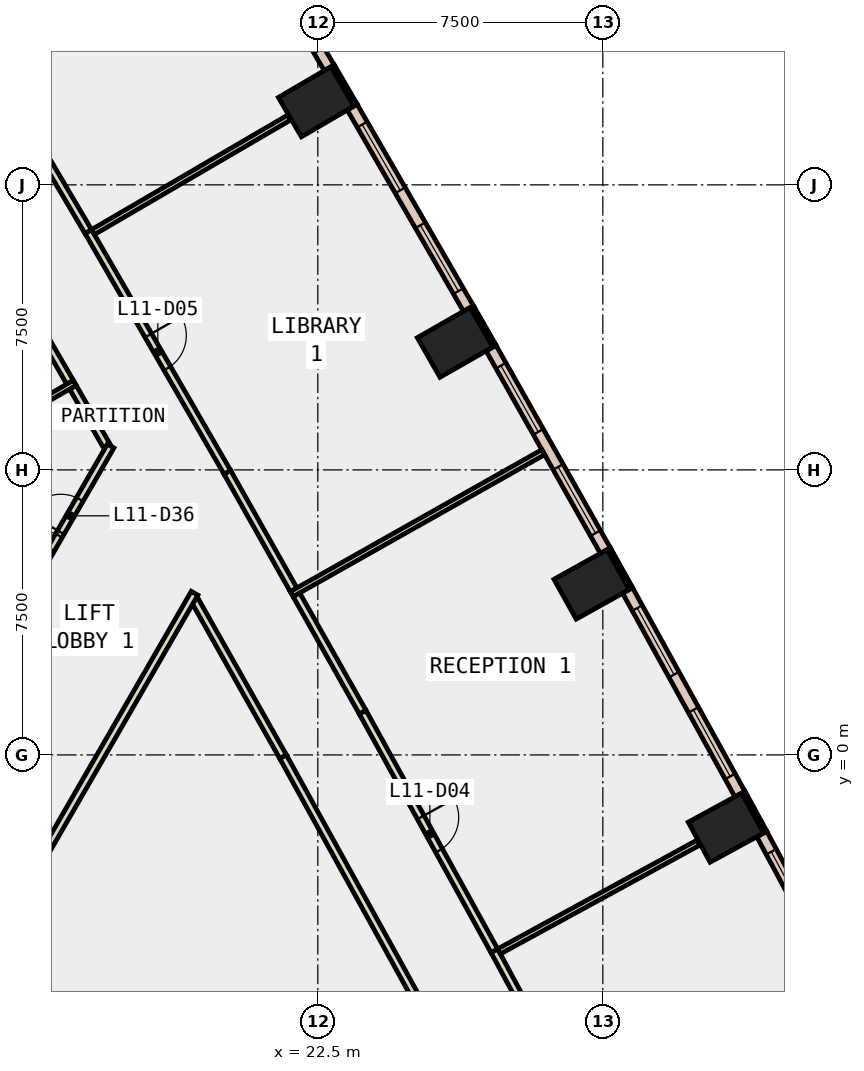
"""IFC4 building model, lengths in metres.
Left out: names, types, materials, properties, quantities, classifications, styles, units other than length and angle.
Written with IfcOpenShell. Run it as: python <this file> out.ifc"""

import sys

from ifc_helpers import new_model, si_unit, direction, frame, frame_2d, origin, origin_2d, place, context, subcontext, project, spatial, rectangle, extrude, element, fill, save


model = new_model("IFC4")
c1 = context("Model", 3, precision=1e-05, world=origin(), true_north=direction((0.0, 1.0)))
c2 = subcontext(c1, "Body", "Model", "MODEL_VIEW")
j1 = project(units=[si_unit("LENGTHUNIT", "METRE"), si_unit("PLANEANGLEUNIT", "RADIAN")], contexts=[c1])
p1 = place(None, origin())
s1 = spatial("IfcSite", under=j1, at=p1, CompositionType="ELEMENT")
p2 = place(p1, origin())
s2 = spatial("IfcBuilding", under=s1, at=p2, CompositionType="ELEMENT")
p3 = place(p2, frame((0.0, 0.0, 56.0)))
s3 = spatial("IfcBuildingStorey", under=s2, at=p3, CompositionType="ELEMENT", Elevation=56.0)
for number, where, z_axis, x_axis in (
    (1, (33.238, -1.913, -0.4), (0.0, 0.0, 1.0), (-0.478, 0.878, 0.0)),
    (2, (29.706, 4.487, -0.4), (0.0, 0.0, 1.0), (-0.487, 0.873, 0.0)),
    (3, (26.112, 10.855, -0.4), (0.0, 0.0, 1.0), (-0.496, 0.869, 0.0)),
    (4, (22.457, 17.186, -0.4), (0.0, 0.0, 1.0), (-0.504, 0.864, 0.0)),
):
    element("IfcColumn", number, at=place(p3, frame(where, z_axis=z_axis, x_axis=x_axis)), inside=s3, PredefinedType="COLUMN", context=c2, shape_type="SweptSolid", body=[
        extrude(rectangle(XDim=1.2, YDim=1.6, at=origin_2d()), origin(), (0.0, 0.0, 1.0), 4.2),
    ])
p4 = place(p3, frame((9.31, -5.375, -0.4), z_axis=(0.0, 0.0, 1.0), x_axis=(0.866017533419, -0.500013631625, 0.0)))
e5 = element("IfcWall", 5, at=p4, inside=s3, PredefinedType="SHEAR", context=c2, shape_type="SweptSolid", body=[
    extrude(rectangle(XDim=9.0, YDim=0.8, at=frame_2d((4.5, 0.0))), origin(), (0.0, 0.0, 1.0), 4.2),
])
p5 = place(p3, frame((34.271, -2.034, 0.0), z_axis=(0.0, 0.0, 1.0), x_axis=(-0.478267644701, 0.878214131082, 0.0)))
e6 = element("IfcWall", 6, at=p5, inside=s3, PredefinedType="STANDARD", context=c2, shape_type="SweptSolid", body=[
    extrude(rectangle(XDim=1.2, YDim=0.1, at=frame_2d((0.6, 0.0))), origin(), (0.0, 0.0, 1.0), 3.8),
])
p6 = place(p3, frame((30.74, 4.377, 0.0), z_axis=(0.0, 0.0, 1.0), x_axis=(-0.486730996044, 0.87355190887, 0.0)))
e7 = element("IfcWall", 7, at=p6, inside=s3, PredefinedType="STANDARD", context=c2, shape_type="SweptSolid", body=[
    extrude(rectangle(XDim=1.2, YDim=0.1, at=frame_2d((0.6, 0.0))), origin(), (0.0, 0.0, 1.0), 3.8),
])
p7 = place(p3, frame((27.148, 10.755, 0.0), z_axis=(0.0, 0.0, 1.0), x_axis=(-0.495766453659, 0.86845588456, 0.0)))
e8 = element("IfcWall", 8, at=p7, inside=s3, PredefinedType="STANDARD", context=c2, shape_type="SweptSolid", body=[
    extrude(rectangle(XDim=1.2, YDim=0.1, at=frame_2d((0.6, 0.0))), origin(), (0.0, 0.0, 1.0), 3.8),
])
p8 = place(p3, frame((23.493, 17.097, 0.0), z_axis=(0.0, 0.0, 1.0), x_axis=(-0.504225229382, 0.863572184623, 0.0)))
e9 = element("IfcWall", 9, at=p8, inside=s3, PredefinedType="STANDARD", context=c2, shape_type="SweptSolid", body=[
    extrude(rectangle(XDim=1.2, YDim=0.1, at=frame_2d((0.6, 0.0))), origin(), (0.0, 0.0, 1.0), 3.8),
])
p9 = place(p3, frame((37.086, -7.47, 0.0), z_axis=(0.0, 0.0, 1.0), x_axis=(-0.474584950749, 0.880209704856, 0.0)))
e10 = element("IfcWall", 10, at=p9, inside=s3, PredefinedType="STANDARD", context=c2, shape_type="SweptSolid", body=[
    extrude(rectangle(XDim=6.121, YDim=0.3, at=frame_2d((3.061, 0.0))), origin(), (0.0, 0.0, 1.0), 3.8),
])
p10 = place(p9, frame((0.53, 0.0, 0.9)))
e11 = element("IfcOpeningElement", 11, at=p10, cuts=e10, PredefinedType="OPENING", context=c2, shape_type="SweptSolid", body=[
    extrude(rectangle(XDim=2.0, YDim=2.6, at=frame_2d((1.0, 1.3))), frame((0.0, 0.16, 0.0), z_axis=(0.0, -1.0, 0.0), x_axis=(1.0, 0.0, 0.0)), (0.0, 0.0, 1.0), 0.32),
])
p11 = place(p9, frame((3.591, 0.0, 0.9)))
e12 = element("IfcOpeningElement", 12, at=p11, cuts=e10, PredefinedType="OPENING", context=c2, shape_type="SweptSolid", body=[
    extrude(rectangle(XDim=2.0, YDim=2.6, at=frame_2d((1.0, 1.3))), frame((0.0, 0.16, 0.0), z_axis=(0.0, -1.0, 0.0), x_axis=(1.0, 0.0, 0.0)), (0.0, 0.0, 1.0), 0.32),
])
p12 = place(p3, frame((33.607, -1.03, 0.0), z_axis=(0.0, 0.0, 1.0), x_axis=(-0.483195456594, 0.875512507465, 0.0)))
e13 = element("IfcWall", 13, at=p12, inside=s3, PredefinedType="STANDARD", context=c2, shape_type="SweptSolid", body=[
    extrude(rectangle(XDim=6.12, YDim=0.3, at=frame_2d((3.06, 0.0))), origin(), (0.0, 0.0, 1.0), 3.8),
])
p13 = place(p12, frame((0.53, 0.0, 0.9)))
e14 = element("IfcOpeningElement", 14, at=p13, cuts=e13, PredefinedType="OPENING", context=c2, shape_type="SweptSolid", body=[
    extrude(rectangle(XDim=2.0, YDim=2.6, at=frame_2d((1.0, 1.3))), frame((0.0, 0.16, 0.0), z_axis=(0.0, -1.0, 0.0), x_axis=(1.0, 0.0, 0.0)), (0.0, 0.0, 1.0), 0.32),
])
p14 = place(p12, frame((3.59, 0.0, 0.9)))
e15 = element("IfcOpeningElement", 15, at=p14, cuts=e13, PredefinedType="OPENING", context=c2, shape_type="SweptSolid", body=[
    extrude(rectangle(XDim=2.0, YDim=2.6, at=frame_2d((1.0, 1.3))), frame((0.0, 0.16, 0.0), z_axis=(0.0, -1.0, 0.0), x_axis=(1.0, 0.0, 0.0)), (0.0, 0.0, 1.0), 0.32),
])
p15 = place(p3, frame((30.067, 5.374, 0.0), z_axis=(0.0, 0.0, 1.0), x_axis=(-0.49151046248, 0.870871669807, 0.0)))
e16 = element("IfcWall", 16, at=p15, inside=s3, PredefinedType="STANDARD", context=c2, shape_type="SweptSolid", body=[
    extrude(rectangle(XDim=6.122, YDim=0.3, at=frame_2d((3.061, 0.0))), origin(), (0.0, 0.0, 1.0), 3.8),
])
p16 = place(p15, frame((0.53, 0.0, 0.9)))
e17 = element("IfcOpeningElement", 17, at=p16, cuts=e16, PredefinedType="OPENING", context=c2, shape_type="SweptSolid", body=[
    extrude(rectangle(XDim=2.0, YDim=2.6, at=frame_2d((1.0, 1.3))), frame((0.0, 0.16, 0.0), z_axis=(0.0, -1.0, 0.0), x_axis=(1.0, 0.0, 0.0)), (0.0, 0.0, 1.0), 0.32),
])
p17 = place(p15, frame((3.591, 0.0, 0.9)))
e18 = element("IfcOpeningElement", 18, at=p17, cuts=e16, PredefinedType="OPENING", context=c2, shape_type="SweptSolid", body=[
    extrude(rectangle(XDim=2.0, YDim=2.6, at=frame_2d((1.0, 1.3))), frame((0.0, 0.16, 0.0), z_axis=(0.0, -1.0, 0.0), x_axis=(1.0, 0.0, 0.0)), (0.0, 0.0, 1.0), 0.32),
])
p18 = place(p3, frame((26.464, 11.745, 0.0), z_axis=(0.0, 0.0, 1.0), x_axis=(-0.499957248001, 0.866050085256, 0.0)))
e19 = element("IfcWall", 19, at=p18, inside=s3, PredefinedType="STANDARD", context=c2, shape_type="SweptSolid", body=[
    extrude(rectangle(XDim=6.121, YDim=0.3, at=frame_2d((3.06, 0.0))), origin(), (0.0, 0.0, 1.0), 3.8),
])
p19 = place(p18, frame((0.53, 0.0, 0.9)))
e20 = element("IfcOpeningElement", 20, at=p19, cuts=e19, PredefinedType="OPENING", context=c2, shape_type="SweptSolid", body=[
    extrude(rectangle(XDim=2.0, YDim=2.6, at=frame_2d((1.0, 1.3))), frame((0.0, 0.16, 0.0), z_axis=(0.0, -1.0, 0.0), x_axis=(1.0, 0.0, 0.0)), (0.0, 0.0, 1.0), 0.32),
])
p20 = place(p18, frame((3.591, 0.0, 0.9)))
e21 = element("IfcOpeningElement", 21, at=p20, cuts=e19, PredefinedType="OPENING", context=c2, shape_type="SweptSolid", body=[
    extrude(rectangle(XDim=2.0, YDim=2.6, at=frame_2d((1.0, 1.3))), frame((0.0, 0.16, 0.0), z_axis=(0.0, -1.0, 0.0), x_axis=(1.0, 0.0, 0.0)), (0.0, 0.0, 1.0), 0.32),
])
p21 = place(p3, frame((22.8, 18.08, 0.0), z_axis=(0.0, 0.0, 1.0), x_axis=(-0.508412153373, 0.861113861404, 0.0)))
e22 = element("IfcWall", 22, at=p21, inside=s3, PredefinedType="STANDARD", context=c2, shape_type="SweptSolid", body=[
    extrude(rectangle(XDim=6.121, YDim=0.3, at=frame_2d((3.061, 0.0))), origin(), (0.0, 0.0, 1.0), 3.8),
])
p22 = place(p21, frame((0.53, 0.0, 0.9)))
e23 = element("IfcOpeningElement", 23, at=p22, cuts=e22, PredefinedType="OPENING", context=c2, shape_type="SweptSolid", body=[
    extrude(rectangle(XDim=2.0, YDim=2.6, at=frame_2d((1.0, 1.3))), frame((0.0, 0.16, 0.0), z_axis=(0.0, -1.0, 0.0), x_axis=(1.0, 0.0, 0.0)), (0.0, 0.0, 1.0), 0.32),
])
p23 = place(p21, frame((3.591, 0.0, 0.9)))
e24 = element("IfcOpeningElement", 24, at=p23, cuts=e22, PredefinedType="OPENING", context=c2, shape_type="SweptSolid", body=[
    extrude(rectangle(XDim=2.0, YDim=2.6, at=frame_2d((1.0, 1.3))), frame((0.0, 0.16, 0.0), z_axis=(0.0, -1.0, 0.0), x_axis=(1.0, 0.0, 0.0)), (0.0, 0.0, 1.0), 0.32),
])
p24 = place(p3, frame((15.98, 9.805, 0.0), z_axis=(0.0, 0.0, 1.0), x_axis=(-0.500150684419, 0.865938388614, 0.0)))
e25 = element("IfcWall", 25, at=p24, inside=s3, PredefinedType="PARTITIONING", context=c2, shape_type="SweptSolid", body=[
    extrude(rectangle(XDim=3.109, YDim=0.2, at=frame_2d((1.554, 0.0))), origin(), (0.0, 0.0, 1.0), 3.8),
])
p25 = place(p3, frame((16.948, 8.128, 0.0), z_axis=(0.0, 0.0, 1.0), x_axis=(-0.499931460552, 0.866064971437, 0.0)))
e26 = element("IfcWall", 26, at=p25, inside=s3, PredefinedType="PARTITIONING", context=c2, shape_type="SweptSolid", body=[
    extrude(rectangle(XDim=1.786, YDim=0.2, at=frame_2d((0.893, 0.0))), origin(), (0.0, 0.0, 1.0), 3.8),
])
p26 = place(p3, frame((25.074, -6.368, 0.0), z_axis=(0.0, 0.0, 1.0), x_axis=(-0.483126495407, 0.875550563609, 0.0)))
e27 = element("IfcWall", 27, at=p26, inside=s3, PredefinedType="PARTITIONING", context=c2, shape_type="SweptSolid", body=[
    extrude(rectangle(XDim=7.222, YDim=0.2, at=frame_2d((3.611, 0.0))), origin(), (0.0, 0.0, 1.0), 3.8),
])
p27 = place(p3, frame((21.585, -0.045, 0.0), z_axis=(0.0, 0.0, 1.0), x_axis=(-0.491542684896, 0.870853483042, 0.0)))
e28 = element("IfcWall", 28, at=p27, inside=s3, PredefinedType="PARTITIONING", context=c2, shape_type="SweptSolid", body=[
    extrude(rectangle(XDim=4.738, YDim=0.2, at=frame_2d((2.369, 0.0))), origin(), (0.0, 0.0, 1.0), 3.8),
])
p28 = place(p3, frame((27.145, -5.152, 0.0), z_axis=(0.0, 0.0, 1.0), x_axis=(0.474591029089, -0.880206427554, 0.0)))
e29 = element("IfcWall", 29, at=p28, inside=s3, PredefinedType="PARTITIONING", context=c2, shape_type="SweptSolid", body=[
    extrude(rectangle(XDim=7.32, YDim=0.2, at=frame_2d((3.66, 0.0))), origin(), (0.0, 0.0, 1.0), 3.8),
])
p29 = place(p28, frame((3.235, 0.0, 0.0)))
e30 = element("IfcOpeningElement", 30, at=p29, cuts=e29, PredefinedType="OPENING", context=c2, shape_type="SweptSolid", body=[
    extrude(rectangle(XDim=1.0, YDim=2.1, at=frame_2d((0.5, 1.05))), frame((0.0, 0.11, 0.0), z_axis=(0.0, -1.0, 0.0), x_axis=(1.0, 0.0, 0.0)), (0.0, 0.0, 1.0), 0.22),
])
p30 = place(p3, frame((21.937, 4.214, 0.0), z_axis=(0.0, 0.0, 1.0), x_axis=(0.491485799319, -0.870885588965, 0.0)))
e31 = element("IfcWall", 31, at=p30, inside=s3, PredefinedType="PARTITIONING", context=c2, shape_type="SweptSolid", body=[
    extrude(rectangle(XDim=3.548, YDim=0.2, at=frame_2d((1.774, 0.0))), origin(), (0.0, 0.0, 1.0), 3.8),
])
p31 = place(p3, frame((23.681, 1.124, 0.0), z_axis=(0.0, 0.0, 1.0), x_axis=(0.483125061868, -0.875551354631, 0.0)))
e32 = element("IfcWall", 32, at=p31, inside=s3, PredefinedType="PARTITIONING", context=c2, shape_type="SweptSolid", body=[
    extrude(rectangle(XDim=7.168, YDim=0.2, at=frame_2d((3.584, 0.0))), origin(), (0.0, 0.0, 1.0), 3.8),
])
p32 = place(p31, frame((3.159, 0.0, 0.0)))
e33 = element("IfcOpeningElement", 33, at=p32, cuts=e32, PredefinedType="OPENING", context=c2, shape_type="SweptSolid", body=[
    extrude(rectangle(XDim=1.0, YDim=2.1, at=frame_2d((0.5, 1.05))), frame((0.0, 0.11, 0.0), z_axis=(0.0, -1.0, 0.0), x_axis=(1.0, 0.0, 0.0)), (0.0, 0.0, 1.0), 0.22),
])
p33 = place(p3, frame((16.46, 13.772, 0.0), z_axis=(0.0, 0.0, 1.0), x_axis=(0.500099745063, -0.865967808286, 0.0)))
e34 = element("IfcWall", 34, at=p33, inside=s3, PredefinedType="PARTITIONING", context=c2, shape_type="SweptSolid", body=[
    extrude(rectangle(XDim=7.319, YDim=0.2, at=frame_2d((3.659, 0.0))), origin(), (0.0, 0.0, 1.0), 3.8),
])
p34 = place(p33, frame((3.159, 0.0, 0.0)))
e35 = element("IfcOpeningElement", 35, at=p34, cuts=e34, PredefinedType="OPENING", context=c2, shape_type="SweptSolid", body=[
    extrude(rectangle(XDim=1.0, YDim=2.1, at=frame_2d((0.5, 1.05))), frame((0.0, 0.11, 0.0), z_axis=(0.0, -1.0, 0.0), x_axis=(1.0, 0.0, 0.0)), (0.0, 0.0, 1.0), 0.22),
])
p35 = place(p3, frame((20.12, 7.434, 0.0), z_axis=(0.0, 0.0, 1.0), x_axis=(0.491394823876, -0.87093692485, 0.0)))
e36 = element("IfcWall", 36, at=p35, inside=s3, PredefinedType="PARTITIONING", context=c2, shape_type="SweptSolid", body=[
    extrude(rectangle(XDim=3.547, YDim=0.2, at=frame_2d((1.773, 0.0))), origin(), (0.0, 0.0, 1.0), 3.8),
])
p36 = place(p3, frame((12.815, 19.946, 0.0), z_axis=(0.0, 0.0, 1.0), x_axis=(0.508287536166, -0.861187424768, 0.0)))
e37 = element("IfcWall", 37, at=p36, inside=s3, PredefinedType="PARTITIONING", context=c2, shape_type="SweptSolid", body=[
    extrude(rectangle(XDim=7.169, YDim=0.2, at=frame_2d((3.584, 0.0))), origin(), (0.0, 0.0, 1.0), 3.8),
])
p37 = place(p3, frame((16.104, 9.79, 0.0), z_axis=(0.0, 0.0, 1.0), x_axis=(-0.866023462144, -0.500003363005, 0.0)))
e38 = element("IfcWall", 38, at=p37, inside=s3, PredefinedType="PARTITIONING", context=c2, shape_type="SweptSolid", body=[
    extrude(rectangle(XDim=5.592, YDim=0.15, at=frame_2d((2.796, 0.0))), origin(), (0.0, 0.0, 1.0), 3.8),
])
p38 = place(p3, frame((13.827, 2.55, 0.0), z_axis=(0.0, 0.0, 1.0), x_axis=(0.500093193185, 0.865971591988, 0.0)))
e39 = element("IfcWall", 39, at=p38, inside=s3, PredefinedType="PARTITIONING", context=c2, shape_type="SweptSolid", body=[
    extrude(rectangle(XDim=6.441, YDim=0.2, at=frame_2d((3.221, 0.0))), origin(), (0.0, 0.0, 1.0), 3.8),
])
p39 = place(p38, frame((2.721, 0.0, 0.0)))
e40 = element("IfcOpeningElement", 40, at=p39, cuts=e39, PredefinedType="OPENING", context=c2, shape_type="SweptSolid", body=[
    extrude(rectangle(XDim=1.0, YDim=2.1, at=frame_2d((0.5, 1.05))), frame((0.0, 0.11, 0.0), z_axis=(0.0, -1.0, 0.0), x_axis=(1.0, 0.0, 0.0)), (0.0, 0.0, 1.0), 0.22),
])
p40 = place(p38, frame((3.821, 0.0, 0.0)))
e41 = element("IfcOpeningElement", 41, at=p40, cuts=e39, PredefinedType="OPENING", context=c2, shape_type="SweptSolid", body=[
    extrude(rectangle(XDim=1.0, YDim=2.1, at=frame_2d((0.5, 1.05))), frame((0.0, 0.11, 0.0), z_axis=(0.0, -1.0, 0.0), x_axis=(1.0, 0.0, 0.0)), (0.0, 0.0, 1.0), 0.22),
])
p41 = place(p3, frame((19.257, 4.255, 0.0), z_axis=(0.0, 0.0, 1.0), x_axis=(-0.499978317034, -0.866037922089, 0.0)))
e42 = element("IfcWall", 42, at=p41, inside=s3, PredefinedType="PARTITIONING", context=c2, shape_type="SweptSolid", body=[
    extrude(rectangle(XDim=12.913, YDim=0.2, at=frame_2d((6.456, 0.0))), origin(), (0.0, 0.0, 1.0), 3.8),
])
p42 = place(p3, frame((27.268, -5.171, 0.0), z_axis=(0.0, 0.0, 1.0), x_axis=(0.877837854343, 0.478957932895, 0.0)))
e43 = element("IfcWall", 43, at=p42, inside=s3, PredefinedType="PARTITIONING", context=c2, shape_type="SweptSolid", body=[
    extrude(rectangle(XDim=5.982, YDim=0.15, at=frame_2d((2.991, 0.0))), origin(), (0.0, 0.0, 1.0), 3.8),
])
p43 = place(p3, frame((21.813, 4.231, 0.0), z_axis=(0.0, 0.0, 1.0), x_axis=(0.870901264369, 0.491458022337, 0.0)))
e44 = element("IfcWall", 44, at=p43, inside=s3, PredefinedType="PARTITIONING", context=c2, shape_type="SweptSolid", body=[
    extrude(rectangle(XDim=7.6, YDim=0.15, at=frame_2d((3.8, 0.0))), origin(), (0.0, 0.0, 1.0), 3.8),
])
p44 = place(p3, frame((16.584, 13.757, 0.0), z_axis=(0.0, 0.0, 1.0), x_axis=(0.863565634474, 0.504236447469, 0.0)))
e45 = element("IfcWall", 45, at=p44, inside=s3, PredefinedType="PARTITIONING", context=c2, shape_type="SweptSolid", body=[
    extrude(rectangle(XDim=5.981, YDim=0.15, at=frame_2d((2.99, 0.0))), origin(), (0.0, 0.0, 1.0), 3.8),
])
p45 = place(p11, origin())
e46 = element("IfcWindow", 46, at=p45, inside=s3, PartitioningType="SINGLE_PANEL", PredefinedType="WINDOW", context=c2, shape_type="SweptSolid", body=[
    extrude(rectangle(XDim=2.0, YDim=2.6, at=frame_2d((1.0, 1.3))), frame((0.0, 0.03, 0.0), z_axis=(0.0, -1.0, 0.0), x_axis=(1.0, 0.0, 0.0)), (0.0, 0.0, 1.0), 0.06),
])
fill(e12, e46)
p46 = place(p13, origin())
e47 = element("IfcWindow", 47, at=p46, inside=s3, PartitioningType="SINGLE_PANEL", PredefinedType="WINDOW", context=c2, shape_type="SweptSolid", body=[
    extrude(rectangle(XDim=2.0, YDim=2.6, at=frame_2d((1.0, 1.3))), frame((0.0, 0.03, 0.0), z_axis=(0.0, -1.0, 0.0), x_axis=(1.0, 0.0, 0.0)), (0.0, 0.0, 1.0), 0.06),
])
fill(e14, e47)
p47 = place(p14, origin())
e48 = element("IfcWindow", 48, at=p47, inside=s3, PartitioningType="SINGLE_PANEL", PredefinedType="WINDOW", context=c2, shape_type="SweptSolid", body=[
    extrude(rectangle(XDim=2.0, YDim=2.6, at=frame_2d((1.0, 1.3))), frame((0.0, 0.03, 0.0), z_axis=(0.0, -1.0, 0.0), x_axis=(1.0, 0.0, 0.0)), (0.0, 0.0, 1.0), 0.06),
])
fill(e15, e48)
p48 = place(p16, origin())
e49 = element("IfcWindow", 49, at=p48, inside=s3, PartitioningType="SINGLE_PANEL", PredefinedType="WINDOW", context=c2, shape_type="SweptSolid", body=[
    extrude(rectangle(XDim=2.0, YDim=2.6, at=frame_2d((1.0, 1.3))), frame((0.0, 0.03, 0.0), z_axis=(0.0, -1.0, 0.0), x_axis=(1.0, 0.0, 0.0)), (0.0, 0.0, 1.0), 0.06),
])
fill(e17, e49)
p49 = place(p17, origin())
e50 = element("IfcWindow", 50, at=p49, inside=s3, PartitioningType="SINGLE_PANEL", PredefinedType="WINDOW", context=c2, shape_type="SweptSolid", body=[
    extrude(rectangle(XDim=2.0, YDim=2.6, at=frame_2d((1.0, 1.3))), frame((0.0, 0.03, 0.0), z_axis=(0.0, -1.0, 0.0), x_axis=(1.0, 0.0, 0.0)), (0.0, 0.0, 1.0), 0.06),
])
fill(e18, e50)
p50 = place(p19, origin())
e51 = element("IfcWindow", 51, at=p50, inside=s3, PartitioningType="SINGLE_PANEL", PredefinedType="WINDOW", context=c2, shape_type="SweptSolid", body=[
    extrude(rectangle(XDim=2.0, YDim=2.6, at=frame_2d((1.0, 1.3))), frame((0.0, 0.03, 0.0), z_axis=(0.0, -1.0, 0.0), x_axis=(1.0, 0.0, 0.0)), (0.0, 0.0, 1.0), 0.06),
])
fill(e20, e51)
p51 = place(p20, origin())
e52 = element("IfcWindow", 52, at=p51, inside=s3, PartitioningType="SINGLE_PANEL", PredefinedType="WINDOW", context=c2, shape_type="SweptSolid", body=[
    extrude(rectangle(XDim=2.0, YDim=2.6, at=frame_2d((1.0, 1.3))), frame((0.0, 0.03, 0.0), z_axis=(0.0, -1.0, 0.0), x_axis=(1.0, 0.0, 0.0)), (0.0, 0.0, 1.0), 0.06),
])
fill(e21, e52)
p52 = place(p32, origin())
e53 = element("IfcDoor", 53, at=p52, inside=s3, OperationType="SINGLE_SWING_LEFT", PredefinedType="DOOR", context=c2, shape_type="SweptSolid", body=[
    extrude(rectangle(XDim=1.0, YDim=2.1, at=frame_2d((0.5, 1.05))), frame((0.0, 0.025, 0.0), z_axis=(0.0, -1.0, 0.0), x_axis=(1.0, 0.0, 0.0)), (0.0, 0.0, 1.0), 0.05),
])
fill(e33, e53)
p53 = place(p34, origin())
e54 = element("IfcDoor", 54, at=p53, inside=s3, OperationType="SINGLE_SWING_LEFT", PredefinedType="DOOR", context=c2, shape_type="SweptSolid", body=[
    extrude(rectangle(XDim=1.0, YDim=2.1, at=frame_2d((0.5, 1.05))), frame((0.0, 0.025, 0.0), z_axis=(0.0, -1.0, 0.0), x_axis=(1.0, 0.0, 0.0)), (0.0, 0.0, 1.0), 0.05),
])
fill(e35, e54)
p54 = place(p39, origin())
e55 = element("IfcDoor", 55, at=p54, inside=s3, OperationType="SINGLE_SWING_LEFT", PredefinedType="DOOR", context=c2, shape_type="SweptSolid", body=[
    extrude(rectangle(XDim=1.0, YDim=2.1, at=frame_2d((0.5, 1.05))), frame((0.0, 0.025, 0.0), z_axis=(0.0, -1.0, 0.0), x_axis=(1.0, 0.0, 0.0)), (0.0, 0.0, 1.0), 0.05),
])
fill(e40, e55)
p55 = place(p40, origin())
e56 = element("IfcDoor", 56, at=p55, inside=s3, OperationType="SINGLE_SWING_RIGHT", PredefinedType="DOOR", context=c2, shape_type="SweptSolid", body=[
    extrude(rectangle(XDim=1.0, YDim=2.1, at=frame_2d((0.5, 1.05))), frame((0.0, 0.025, 0.0), z_axis=(0.0, -1.0, 0.0), x_axis=(1.0, 0.0, 0.0)), (0.0, 0.0, 1.0), 0.05),
])
fill(e41, e56)
save(model, sys.argv[1])
